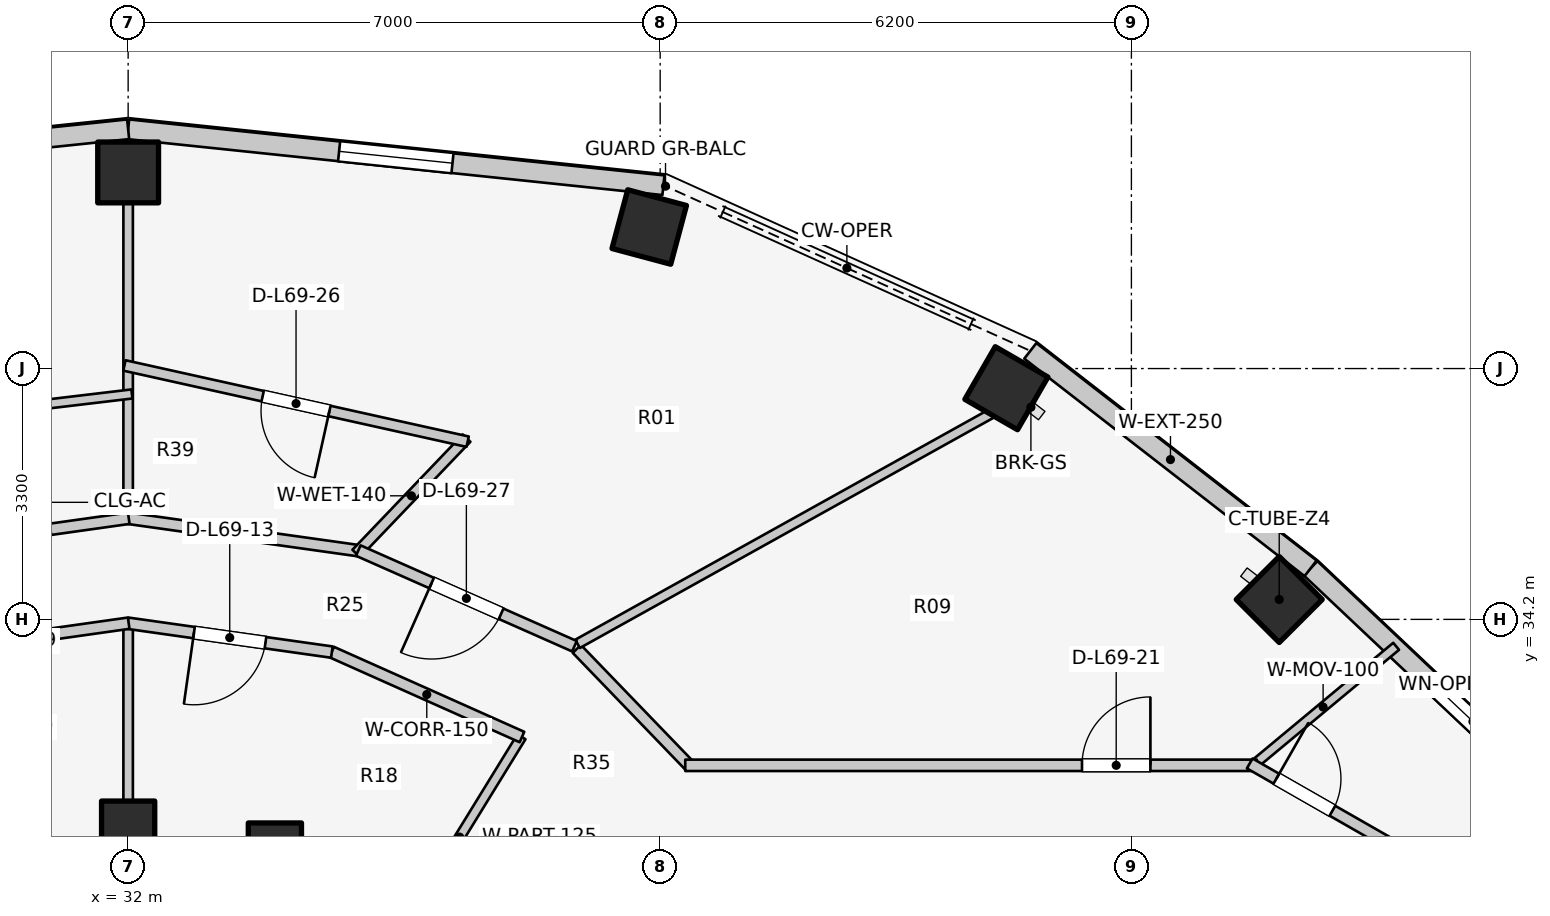
"""IFC4 building model, lengths in metres.
Left out: names, types, materials, properties, quantities, classifications, styles, units other than length and angle.
Written with IfcOpenShell. Run it as: python <this file> out.ifc"""

import sys

from ifc_helpers import new_model, si_unit, direction, frame, frame_2d, origin, origin_2d, place, context, subcontext, project, spatial, rectangle, extrude, element, fill, save


model = new_model("IFC4")
c1 = context("Model", 3, precision=1e-05, world=origin(), true_north=direction((0.0, 1.0)))
c2 = subcontext(c1, "Body", "Model", "MODEL_VIEW")
j1 = project(units=[si_unit("LENGTHUNIT", "METRE"), si_unit("PLANEANGLEUNIT", "RADIAN")], contexts=[c1])
p1 = place(None, origin())
s1 = spatial("IfcSite", under=j1, at=p1, CompositionType="ELEMENT")
p2 = place(p1, origin())
s2 = spatial("IfcBuilding", under=s1, at=p2, CompositionType="ELEMENT")
p3 = place(p2, frame((0.0, 0.0, 226.4)))
s3 = spatial("IfcBuildingStorey", under=s2, at=p3, CompositionType="ELEMENT", Elevation=226.4)
for number, where, z_axis, x_axis in (
    (1, (47.145, 34.462, 0.0), (0.0, 0.0, 1.0), (0.707, 0.707, 0.0)),
    (2, (43.555, 37.241, 0.0), (0.0, 0.0, 1.0), (0.5, 0.866, 0.0)),
):
    element("IfcColumn", number, at=place(p3, frame(where, z_axis=z_axis, x_axis=x_axis)), inside=s3, PredefinedType="COLUMN", context=c2, shape_type="SweptSolid", body=[
        extrude(rectangle(XDim=0.8, YDim=0.8, at=origin_2d()), origin(), (0.0, 0.0, 1.0), 3.1),
    ])
p4 = place(p3, frame((33.931, 31.172, 0.0), z_axis=(0.0, 0.0, 1.0), x_axis=(1.0, 0.0, 0.0)))
e3 = element("IfcColumn", 3, at=p4, inside=s3, PredefinedType="COLUMN", context=c2, shape_type="SweptSolid", body=[
    extrude(rectangle(XDim=0.7, YDim=0.7, at=origin_2d()), origin(), (0.0, 0.0, 1.0), 3.1),
])
p5 = place(p3, frame((38.856, 39.362, 0.0), z_axis=(0.0, 0.0, 1.0), x_axis=(0.258819045103, 0.965925826289, 0.0)))
e4 = element("IfcColumn", 4, at=p5, inside=s3, PredefinedType="COLUMN", context=c2, shape_type="SweptSolid", body=[
    extrude(rectangle(XDim=0.8, YDim=0.8, at=origin_2d()), origin(), (0.0, 0.0, 1.0), 3.1),
])
p6 = place(p3, frame((32.0, 31.46, 0.0), z_axis=(0.0, 0.0, 1.0), x_axis=(1.0, 0.0, 0.0)))
e5 = element("IfcColumn", 5, at=p6, inside=s3, PredefinedType="COLUMN", context=c2, shape_type="SweptSolid", body=[
    extrude(rectangle(XDim=0.7, YDim=0.7, at=origin_2d()), origin(), (0.0, 0.0, 1.0), 3.1),
])
p7 = place(p3, frame((32.0, 40.08, 0.0), z_axis=(0.0, 0.0, 1.0), x_axis=(0.0, 1.0, 0.0)))
e6 = element("IfcColumn", 6, at=p7, inside=s3, PredefinedType="COLUMN", context=c2, shape_type="SweptSolid", body=[
    extrude(rectangle(XDim=0.8, YDim=0.8, at=origin_2d()), origin(), (0.0, 0.0, 1.0), 3.1),
])
p8 = place(p3, frame((50.761, 31.849, 0.0), z_axis=(0.0, 0.0, 1.0), x_axis=(-0.72731899451, 0.686299555752, 0.0)))
e7 = element("IfcWall", 7, at=p8, inside=s3, PredefinedType="STANDARD", context=c2, shape_type="SweptSolid", body=[
    extrude(rectangle(XDim=4.404, YDim=0.26, at=frame_2d((2.202, 0.0))), origin(), (0.0, 0.0, 1.0), 2.85),
])
p9 = place(p8, frame((0.867, 0.0, 0.75)))
e8 = element("IfcOpeningElement", 8, at=p9, cuts=e7, PredefinedType="OPENING", context=c2, shape_type="SweptSolid", body=[
    extrude(rectangle(XDim=1.2, YDim=1.5, at=frame_2d((0.6, 0.75))), frame((0.0, 0.14, 0.0), z_axis=(0.0, -1.0, 0.0), x_axis=(1.0, 0.0, 0.0)), (0.0, 0.0, 1.0), 0.28),
])
p10 = place(p3, frame((47.558, 34.872, 0.0), z_axis=(0.0, 0.0, 1.0), x_axis=(-0.790126214723, 0.612944177563, 0.0)))
e9 = element("IfcWall", 9, at=p10, inside=s3, PredefinedType="STANDARD", context=c2, shape_type="SweptSolid", body=[
    extrude(rectangle(XDim=4.667, YDim=0.26, at=frame_2d((2.333, 0.0))), origin(), (0.0, 0.0, 1.0), 2.85),
])
p11 = place(p3, frame((39.043, 39.912, 0.0), z_axis=(0.0, 0.0, 1.0), x_axis=(-0.994582822721, 0.103947144014, 0.0)))
e10 = element("IfcWall", 10, at=p11, inside=s3, PredefinedType="STANDARD", context=c2, shape_type="SweptSolid", body=[
    extrude(rectangle(XDim=7.081, YDim=0.26, at=frame_2d((3.541, 0.0))), origin(), (0.0, 0.0, 1.0), 2.85),
])
p12 = place(p11, frame((2.791, 0.0, 0.75)))
e11 = element("IfcOpeningElement", 11, at=p12, cuts=e10, PredefinedType="OPENING", context=c2, shape_type="SweptSolid", body=[
    extrude(rectangle(XDim=1.5, YDim=1.6, at=frame_2d((0.75, 0.8))), frame((0.0, 0.14, 0.0), z_axis=(0.0, -1.0, 0.0), x_axis=(1.0, 0.0, 0.0)), (0.0, 0.0, 1.0), 0.28),
])
p13 = place(p3, frame((32.0, 40.648, 0.0), z_axis=(0.0, 0.0, 1.0), x_axis=(-0.994582822721, -0.103947144014, 0.0)))
e12 = element("IfcWall", 12, at=p13, inside=s3, PredefinedType="STANDARD", context=c2, shape_type="SweptSolid", body=[
    extrude(rectangle(XDim=7.081, YDim=0.26, at=frame_2d((3.541, 0.0))), origin(), (0.0, 0.0, 1.0), 2.85),
])
p14 = place(p13, frame((2.341, 0.0, 0.75)))
e13 = element("IfcOpeningElement", 13, at=p14, cuts=e12, PredefinedType="OPENING", context=c2, shape_type="SweptSolid", body=[
    extrude(rectangle(XDim=2.4, YDim=1.7, at=frame_2d((1.2, 0.85))), frame((0.0, 0.14, 0.0), z_axis=(0.0, -1.0, 0.0), x_axis=(1.0, 0.0, 0.0)), (0.0, 0.0, 1.0), 0.28),
])
p15 = place(p3, frame((35.55, 30.015, 0.0), z_axis=(0.0, 0.0, 1.0), x_axis=(0.523992004803, 0.851723182086, 0.0)))
e14 = element("IfcWall", 14, at=p15, inside=s3, PredefinedType="PARTITIONING", context=c2, shape_type="SweptSolid", body=[
    extrude(rectangle(XDim=3.101, YDim=0.125, at=frame_2d((1.551, 0.0))), origin(), (0.0, 0.0, 1.0), 2.376),
])
p16 = place(p3, frame((32.0, 31.1, 0.0), z_axis=(0.0, 0.0, 1.0), x_axis=(0.0, 1.0, 0.0)))
e15 = element("IfcWall", 15, at=p16, inside=s3, PredefinedType="PARTITIONING", context=c2, shape_type="SweptSolid", body=[
    extrude(rectangle(XDim=3.05, YDim=0.125, at=frame_2d((1.525, 0.0))), origin(), (0.0, 0.0, 1.0), 2.376),
])
p17 = place(p3, frame((37.181, 32.652, 0.0), z_axis=(0.0, 0.0, 1.0), x_axis=(-0.913120130558, 0.407690602257, 0.0)))
e16 = element("IfcWall", 16, at=p17, inside=s3, PredefinedType="PARTITIONING", context=c2, shape_type="SweptSolid", body=[
    extrude(rectangle(XDim=2.743, YDim=0.15, at=frame_2d((1.371, 0.0))), origin(), (0.0, 0.0, 1.0), 2.376),
])
p18 = place(p3, frame((34.68, 33.77, 0.0), z_axis=(0.0, 0.0, 1.0), x_axis=(-0.990132151456, 0.140136799779, 0.0)))
e17 = element("IfcWall", 17, at=p18, inside=s3, PredefinedType="PARTITIONING", context=c2, shape_type="SweptSolid", body=[
    extrude(rectangle(XDim=2.714, YDim=0.15, at=frame_2d((1.357, 0.0))), origin(), (0.0, 0.0, 1.0), 2.376),
])
p19 = place(p18, frame((0.882, 0.0, 0.0)))
e18 = element("IfcOpeningElement", 18, at=p19, cuts=e17, PredefinedType="OPENING", context=c2, shape_type="SweptSolid", body=[
    extrude(rectangle(XDim=0.95, YDim=2.1, at=frame_2d((0.475, 1.05))), frame((0.0, 0.085, 0.0), z_axis=(0.0, -1.0, 0.0), x_axis=(1.0, 0.0, 0.0)), (0.0, 0.0, 1.0), 0.17),
])
p20 = place(p3, frame((32.007, 34.15, 0.0), z_axis=(0.0, 0.0, 1.0), x_axis=(-0.990132151456, -0.140136799779, 0.0)))
e19 = element("IfcWall", 19, at=p20, inside=s3, PredefinedType="PARTITIONING", context=c2, shape_type="SweptSolid", body=[
    extrude(rectangle(XDim=2.714, YDim=0.15, at=frame_2d((1.357, 0.0))), origin(), (0.0, 0.0, 1.0), 2.376),
])
p21 = place(p3, frame((46.762, 32.248, 0.0), z_axis=(0.0, 0.0, 1.0), x_axis=(0.76890954941, 0.639357571962, 0.0)))
e20 = element("IfcWall", 20, at=p21, inside=s3, PredefinedType="MOVABLE", context=c2, shape_type="SweptSolid", body=[
    extrude(rectangle(XDim=2.499, YDim=0.12, at=frame_2d((1.25, 0.0))), origin(), (0.0, 0.0, 1.0), 2.22),
])
p22 = place(p3, frame((37.903, 33.812, 0.0), z_axis=(0.0, 0.0, 1.0), x_axis=(0.694032962553, -0.719943224768, 0.0)))
e21 = element("IfcWall", 21, at=p22, inside=s3, PredefinedType="PARTITIONING", context=c2, shape_type="SweptSolid", body=[
    extrude(rectangle(XDim=2.158, YDim=0.15, at=frame_2d((1.079, 0.0))), origin(), (0.0, 0.0, 1.0), 2.376),
])
p23 = place(p3, frame((39.33, 32.28, 0.0), z_axis=(0.0, 0.0, 1.0), x_axis=(1.0, 0.0, 0.0)))
e22 = element("IfcWall", 22, at=p23, inside=s3, PredefinedType="PARTITIONING", context=c2, shape_type="SweptSolid", body=[
    extrude(rectangle(XDim=7.52, YDim=0.15, at=frame_2d((3.76, 0.0))), origin(), (0.0, 0.0, 1.0), 2.376),
])
p24 = place(p23, frame((5.22, 0.0, 0.0)))
e23 = element("IfcOpeningElement", 23, at=p24, cuts=e22, PredefinedType="OPENING", context=c2, shape_type="SweptSolid", body=[
    extrude(rectangle(XDim=0.9, YDim=2.1, at=frame_2d((0.45, 1.05))), frame((0.0, 0.085, 0.0), z_axis=(0.0, -1.0, 0.0), x_axis=(1.0, 0.0, 0.0)), (0.0, 0.0, 1.0), 0.17),
])
p25 = place(p3, frame((46.757, 32.305, 0.0), z_axis=(0.0, 0.0, 1.0), x_axis=(0.867991349648, -0.496579315857, 0.0)))
e24 = element("IfcWall", 24, at=p25, inside=s3, PredefinedType="PARTITIONING", context=c2, shape_type="SweptSolid", body=[
    extrude(rectangle(XDim=2.567, YDim=0.15, at=frame_2d((1.283, 0.0))), origin(), (0.0, 0.0, 1.0), 2.22),
])
p26 = place(p25, frame((0.404, 0.0, 0.0)))
e25 = element("IfcOpeningElement", 25, at=p26, cuts=e24, PredefinedType="OPENING", context=c2, shape_type="SweptSolid", body=[
    extrude(rectangle(XDim=0.85, YDim=2.05, at=frame_2d((0.425, 1.025))), frame((0.0, 0.085, 0.0), z_axis=(0.0, -1.0, 0.0), x_axis=(1.0, 0.0, 0.0)), (0.0, 0.0, 1.0), 0.17),
])
p27 = place(p3, frame((37.913, 33.878, 0.0), z_axis=(0.0, 0.0, 1.0), x_axis=(0.87377679808, 0.486327160599, 0.0)))
e26 = element("IfcWall", 26, at=p27, inside=s3, PredefinedType="PARTITIONING", context=c2, shape_type="SweptSolid", body=[
    extrude(rectangle(XDim=6.24, YDim=0.125, at=frame_2d((3.12, 0.0))), origin(), (0.0, 0.0, 1.0), 2.376),
])
p28 = place(p3, frame((32.0, 35.585, 0.0), z_axis=(0.0, 0.0, 1.0), x_axis=(0.0, 1.0, 0.0)))
e27 = element("IfcWall", 27, at=p28, inside=s3, PredefinedType="PARTITIONING", context=c2, shape_type="SweptSolid", body=[
    extrude(rectangle(XDim=4.115, YDim=0.125, at=frame_2d((2.058, 0.0))), origin(), (0.0, 0.0, 1.0), 2.376),
])
p29 = place(p3, frame((35.085, 35.096, 0.0), z_axis=(0.0, 0.0, 1.0), x_axis=(-0.990254086283, 0.139272555084, 0.0)))
e28 = element("IfcWall", 28, at=p29, inside=s3, PredefinedType="PARTITIONING", context=c2, shape_type="SweptSolid", body=[
    extrude(rectangle(XDim=3.166, YDim=0.15, at=frame_2d((1.583, 0.0))), origin(), (0.0, 0.0, 1.0), 2.376),
])
p30 = place(p3, frame((35.001, 35.067, 0.0), z_axis=(0.0, 0.0, 1.0), x_axis=(0.691180416361, 0.722682248321, 0.0)))
e29 = element("IfcWall", 29, at=p30, inside=s3, PredefinedType="PLUMBINGWALL", context=c2, shape_type="SweptSolid", body=[
    extrude(rectangle(XDim=2.1, YDim=0.14, at=frame_2d((1.05, 0.0))), origin(), (0.0, 0.0, 1.0), 2.385),
])
p31 = place(p3, frame((36.467, 36.538, 0.0), z_axis=(0.0, 0.0, 1.0), x_axis=(-0.976214372251, 0.21680751696, 0.0)))
e30 = element("IfcWall", 30, at=p31, inside=s3, PredefinedType="PLUMBINGWALL", context=c2, shape_type="SweptSolid", body=[
    extrude(rectangle(XDim=4.626, YDim=0.14, at=frame_2d((2.313, 0.0))), origin(), (0.0, 0.0, 1.0), 2.376),
])
p32 = place(p31, frame((1.863, 0.0, 0.0)))
e31 = element("IfcOpeningElement", 31, at=p32, cuts=e30, PredefinedType="OPENING", context=c2, shape_type="SweptSolid", body=[
    extrude(rectangle(XDim=0.9, YDim=2.1, at=frame_2d((0.45, 1.05))), frame((0.0, 0.08, 0.0), z_axis=(0.0, -1.0, 0.0), x_axis=(1.0, 0.0, 0.0)), (0.0, 0.0, 1.0), 0.16),
])
p33 = place(p3, frame((37.872, 33.847, 0.0), z_axis=(0.0, 0.0, 1.0), x_axis=(-0.914490094652, 0.40460828808, 0.0)))
e32 = element("IfcWall", 32, at=p33, inside=s3, PredefinedType="PARTITIONING", context=c2, shape_type="SweptSolid", body=[
    extrude(rectangle(XDim=3.11, YDim=0.15, at=frame_2d((1.555, 0.0))), origin(), (0.0, 0.0, 1.0), 2.376),
])
p34 = place(p33, frame((1.055, 0.0, 0.0)))
e33 = element("IfcOpeningElement", 33, at=p34, cuts=e32, PredefinedType="OPENING", context=c2, shape_type="SweptSolid", body=[
    extrude(rectangle(XDim=1.0, YDim=2.1, at=frame_2d((0.5, 1.05))), frame((0.0, 0.085, 0.0), z_axis=(0.0, -1.0, 0.0), x_axis=(1.0, 0.0, 0.0)), (0.0, 0.0, 1.0), 0.17),
])
p35 = place(p3, frame((32.05, 37.166, 0.0), z_axis=(0.0, 0.0, 1.0), x_axis=(-0.992963303559, -0.118422454736, 0.0)))
e34 = element("IfcWall", 34, at=p35, inside=s3, PredefinedType="MOVABLE", context=c2, shape_type="SweptSolid", body=[
    extrude(rectangle(XDim=4.622, YDim=0.12, at=frame_2d((2.311, 0.0))), origin(), (0.0, 0.0, 1.0), 2.376),
])
p36 = place(p35, frame((1.836, 0.0, 0.0)))
e35 = element("IfcOpeningElement", 35, at=p36, cuts=e34, PredefinedType="OPENING", context=c2, shape_type="SweptSolid", body=[
    extrude(rectangle(XDim=0.95, YDim=2.1, at=frame_2d((0.475, 1.05))), frame((0.0, 0.07, 0.0), z_axis=(0.0, -1.0, 0.0), x_axis=(1.0, 0.0, 0.0)), (0.0, 0.0, 1.0), 0.14),
])
p37 = place(p3, frame((32.008, 35.53, 0.0), z_axis=(0.0, 0.0, 1.0), x_axis=(-0.990257602807, -0.139247549651, 0.0)))
e36 = element("IfcWall", 36, at=p37, inside=s3, PredefinedType="PARTITIONING", context=c2, shape_type="SweptSolid", body=[
    extrude(rectangle(XDim=3.082, YDim=0.15, at=frame_2d((1.541, 0.0))), origin(), (0.0, 0.0, 1.0), 2.376),
])
p38 = place(p37, frame((1.041, 0.0, 0.0)))
e37 = element("IfcOpeningElement", 37, at=p38, cuts=e36, PredefinedType="OPENING", context=c2, shape_type="SweptSolid", body=[
    extrude(rectangle(XDim=1.0, YDim=2.1, at=frame_2d((0.5, 1.05))), frame((0.0, 0.085, 0.0), z_axis=(0.0, -1.0, 0.0), x_axis=(1.0, 0.0, 0.0)), (0.0, 0.0, 1.0), 0.17),
])
p39 = place(p9, origin())
e38 = element("IfcWindow", 38, at=p39, inside=s3, PartitioningType="SINGLE_PANEL", PredefinedType="WINDOW", context=c2, shape_type="SweptSolid", body=[
    extrude(rectangle(XDim=1.2, YDim=1.5, at=frame_2d((0.6, 0.75))), frame((0.0, 0.03, 0.0), z_axis=(0.0, -1.0, 0.0), x_axis=(1.0, 0.0, 0.0)), (0.0, 0.0, 1.0), 0.06),
])
fill(e8, e38)
p40 = place(p12, origin())
e39 = element("IfcWindow", 39, at=p40, inside=s3, PartitioningType="SINGLE_PANEL", PredefinedType="WINDOW", context=c2, shape_type="SweptSolid", body=[
    extrude(rectangle(XDim=1.5, YDim=1.6, at=frame_2d((0.75, 0.8))), frame((0.0, 0.03, 0.0), z_axis=(0.0, -1.0, 0.0), x_axis=(1.0, 0.0, 0.0)), (0.0, 0.0, 1.0), 0.06),
])
fill(e11, e39)
p41 = place(p19, origin())
e40 = element("IfcDoor", 40, at=p41, inside=s3, OperationType="SINGLE_SWING_RIGHT", PredefinedType="DOOR", context=c2, shape_type="SweptSolid", body=[
    extrude(rectangle(XDim=0.95, YDim=2.1, at=frame_2d((0.475, 1.05))), frame((0.0, 0.025, 0.0), z_axis=(0.0, -1.0, 0.0), x_axis=(1.0, 0.0, 0.0)), (0.0, 0.0, 1.0), 0.05),
])
fill(e18, e40)
p42 = place(p24, origin())
e41 = element("IfcDoor", 41, at=p42, inside=s3, OperationType="SINGLE_SWING_RIGHT", PredefinedType="DOOR", context=c2, shape_type="SweptSolid", body=[
    extrude(rectangle(XDim=0.9, YDim=2.1, at=frame_2d((0.45, 1.05))), frame((0.0, 0.025, 0.0), z_axis=(0.0, -1.0, 0.0), x_axis=(1.0, 0.0, 0.0)), (0.0, 0.0, 1.0), 0.05),
])
fill(e23, e41)
p43 = place(p26, origin())
e42 = element("IfcDoor", 42, at=p43, inside=s3, OperationType="SINGLE_SWING_LEFT", PredefinedType="DOOR", context=c2, shape_type="SweptSolid", body=[
    extrude(rectangle(XDim=0.85, YDim=2.05, at=frame_2d((0.425, 1.025))), frame((0.0, 0.025, 0.0), z_axis=(0.0, -1.0, 0.0), x_axis=(1.0, 0.0, 0.0)), (0.0, 0.0, 1.0), 0.05),
])
fill(e25, e42)
p44 = place(p32, origin())
e43 = element("IfcDoor", 43, at=p44, inside=s3, OperationType="SINGLE_SWING_LEFT", PredefinedType="DOOR", context=c2, shape_type="SweptSolid", body=[
    extrude(rectangle(XDim=0.9, YDim=2.1, at=frame_2d((0.45, 1.05))), frame((0.0, 0.025, 0.0), z_axis=(0.0, -1.0, 0.0), x_axis=(1.0, 0.0, 0.0)), (0.0, 0.0, 1.0), 0.05),
])
fill(e31, e43)
p45 = place(p34, origin())
e44 = element("IfcDoor", 44, at=p45, inside=s3, OperationType="SINGLE_SWING_RIGHT", PredefinedType="DOOR", context=c2, shape_type="SweptSolid", body=[
    extrude(rectangle(XDim=1.0, YDim=2.1, at=frame_2d((0.5, 1.05))), frame((0.0, 0.025, 0.0), z_axis=(0.0, -1.0, 0.0), x_axis=(1.0, 0.0, 0.0)), (0.0, 0.0, 1.0), 0.05),
])
fill(e33, e44)
save(model, sys.argv[1])
